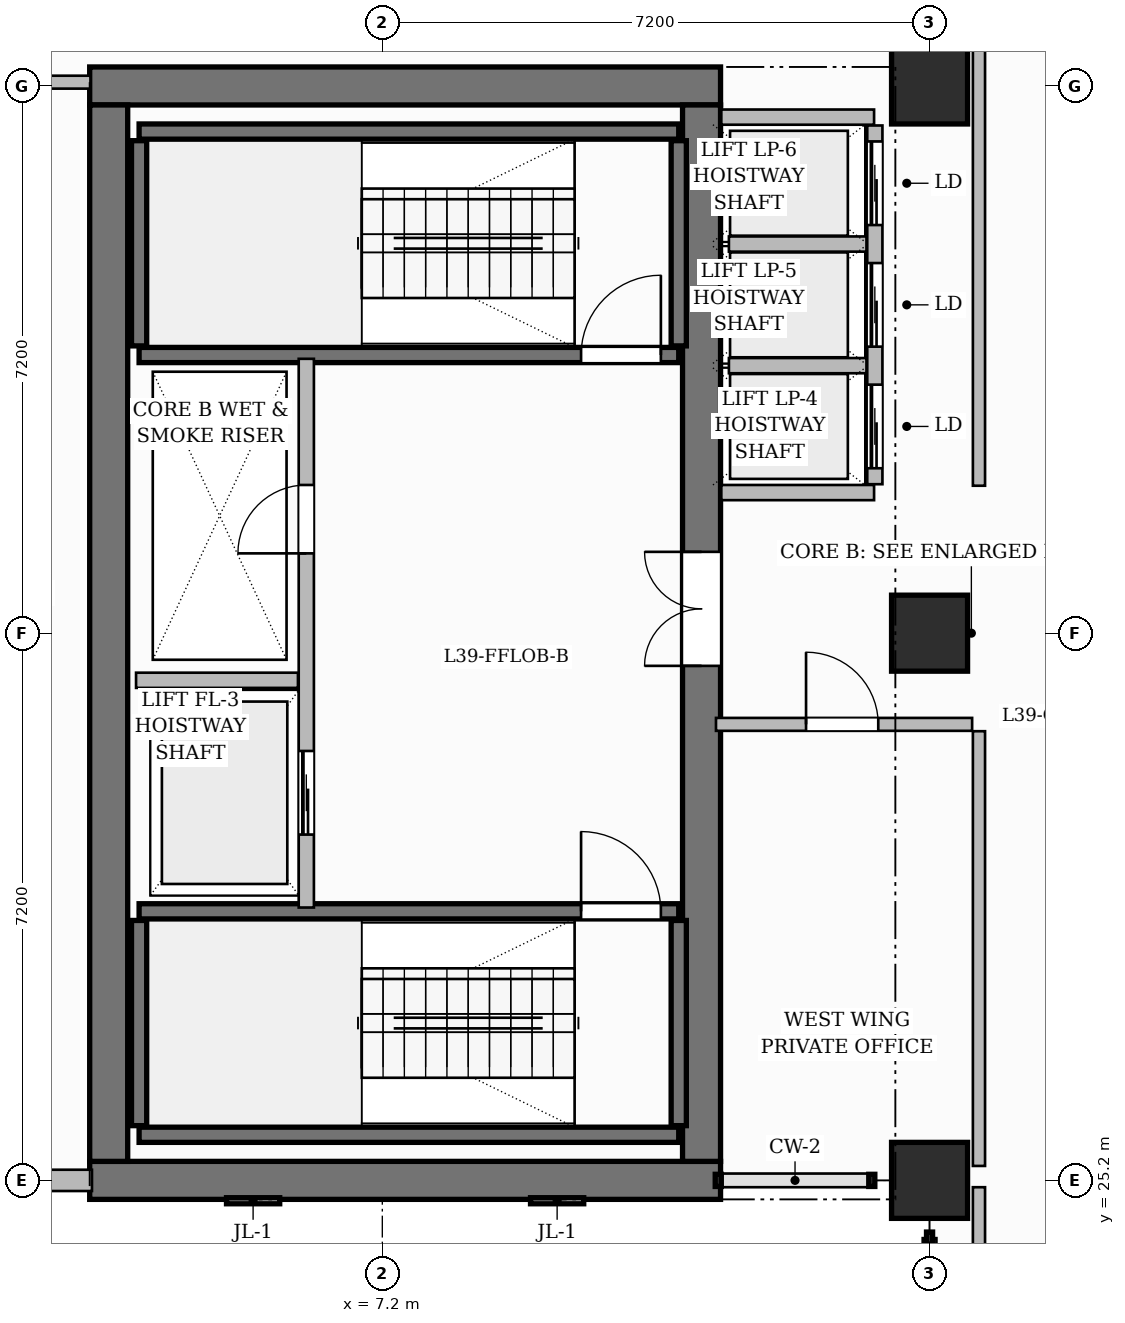
"""IFC4 building model, lengths in metres.
Left out: names, types, materials, properties, quantities, classifications, styles, units other than length and angle.
Written with IfcOpenShell. Run it as: python <this file> out.ifc"""

import sys

from ifc_helpers import new_model, si_unit, direction, frame, frame_2d, origin, origin_2d, place, context, subcontext, project, spatial, rectangle, extrude, source, transform, mapped, element, fill, save


model = new_model("IFC4")
c1 = context("Model", 3, precision=1e-05, world=origin(), true_north=direction((0.0, 1.0)))
c2 = subcontext(c1, "Body", "Model", "MODEL_VIEW")
j1 = project(units=[si_unit("LENGTHUNIT", "METRE"), si_unit("PLANEANGLEUNIT", "RADIAN")], contexts=[c1])
p1 = place(None, origin())
s1 = spatial("IfcSite", under=j1, at=p1, CompositionType="ELEMENT")
p2 = place(p1, origin())
s2 = spatial("IfcBuilding", under=s1, at=p2, CompositionType="ELEMENT")
p3 = place(p2, frame((0.0, 0.0, 158.0)))
s3 = spatial("IfcBuildingStorey", under=s2, at=p3, CompositionType="ELEMENT", Elevation=158.0)
for number, where, z_axis, x_axis in (
    (1, (3.35, 25.2, 0.0), (0.0, 0.0, 1.0), (1.0, 0.0, 0.0)),
    (2, (3.35, 39.6, 0.0), (0.0, 0.0, 1.0), (1.0, 0.0, 0.0)),
):
    element("IfcWall", number, at=place(p3, frame(where, z_axis=z_axis, x_axis=x_axis)), inside=s3, PredefinedType="SHEAR", context=c2, shape_type="SweptSolid", body=[
        extrude(rectangle(XDim=8.3, YDim=0.5, at=frame_2d((4.15, 0.0))), origin(), (0.0, 0.0, 1.0), 3.85),
    ])
p4 = place(p3, frame((3.6, 25.45, 0.0), z_axis=(0.0, 0.0, 1.0), x_axis=(0.0, 1.0, 0.0)))
e3 = element("IfcWall", 3, at=p4, inside=s3, PredefinedType="SHEAR", context=c2, shape_type="SweptSolid", body=[
    extrude(rectangle(XDim=13.9, YDim=0.5, at=frame_2d((6.95, 0.0))), origin(), (0.0, 0.0, 1.0), 3.85),
])
p5 = place(p3, frame((11.4, 25.45, 0.0), z_axis=(0.0, 0.0, 1.0), x_axis=(0.0, 1.0, 0.0)))
e4 = element("IfcWall", 4, at=p5, inside=s3, PredefinedType="SHEAR", context=c2, shape_type="SweptSolid", body=[
    extrude(rectangle(XDim=13.9, YDim=0.5, at=frame_2d((6.95, 0.0))), origin(), (0.0, 0.0, 1.0), 3.85),
])
p6 = place(p5, frame((6.52, 0.0, 0.0)))
e5 = element("IfcOpeningElement", 5, at=p6, cuts=e4, PredefinedType="OPENING", context=c2, shape_type="SweptSolid", body=[
    extrude(rectangle(XDim=1.5, YDim=2.2, at=frame_2d((0.75, 1.1))), frame((0.0, 0.26, 0.0), z_axis=(0.0, -1.0, 0.0), x_axis=(1.0, 0.0, 0.0)), (0.0, 0.0, 1.0), 0.52),
])
m1 = source(origin(), c2, "Body", "SweptSolid", [
    extrude(rectangle(XDim=1.0, YDim=1.0, at=origin_2d()), origin(), (0.0, 0.0, 1.0), 3.85),
])
for number, where, z_axis, x_axis in (
    (6, (14.4, 25.2, 0.0), (0.0, 0.0, 1.0), (1.0, 0.0, 0.0)),
    (7, (14.4, 32.4, 0.0), (0.0, 0.0, 1.0), (1.0, 0.0, 0.0)),
    (8, (14.4, 39.6, 0.0), (0.0, 0.0, 1.0), (1.0, 0.0, 0.0)),
):
    element("IfcColumn", number, at=place(p3, frame(where, z_axis=z_axis, x_axis=x_axis)), inside=s3, PredefinedType="COLUMN", context=c2, shape_type="MappedRepresentation", body=[
        mapped(m1, transform((0.0, 0.0, 0.0), scale=1.0)),
    ])
p7 = place(p3, frame((4.0, 25.8, 0.0), z_axis=(0.0, 0.0, 1.0), x_axis=(1.0, 0.0, 0.0)))
e9 = element("IfcWall", 9, at=p7, inside=s3, PredefinedType="SHEAR", context=c2, shape_type="SweptSolid", body=[
    extrude(rectangle(XDim=7.1, YDim=0.2, at=frame_2d((3.55, 0.0))), origin(), (0.0, 0.0, 1.0), 3.85),
])
for number, where, z_axis, x_axis in (
    (10, (4.0, 25.92, 0.0), (0.0, 0.0, 1.0), (0.0, 1.0, 0.0)),
    (11, (11.1, 25.92, 0.0), (0.0, 0.0, 1.0), (0.0, 1.0, 0.0)),
):
    element("IfcWall", number, at=place(p3, frame(where, z_axis=z_axis, x_axis=x_axis)), inside=s3, PredefinedType="SHEAR", context=c2, shape_type="SweptSolid", body=[
        extrude(rectangle(XDim=2.7, YDim=0.2, at=frame_2d((1.35, 0.0))), origin(), (0.0, 0.0, 1.0), 3.85),
    ])
p8 = place(p3, frame((4.0, 28.74, 0.0), z_axis=(0.0, 0.0, 1.0), x_axis=(1.0, 0.0, 0.0)))
e12 = element("IfcWall", 12, at=p8, inside=s3, PredefinedType="SHEAR", context=c2, shape_type="SweptSolid", body=[
    extrude(rectangle(XDim=7.1, YDim=0.2, at=frame_2d((3.55, 0.0))), origin(), (0.0, 0.0, 1.0), 3.85),
])
p9 = place(p8, frame((5.815, 0.0, 0.0)))
e13 = element("IfcOpeningElement", 13, at=p9, cuts=e12, PredefinedType="OPENING", context=c2, shape_type="SweptSolid", body=[
    extrude(rectangle(XDim=1.05, YDim=2.2, at=frame_2d((0.525, 1.1))), frame((0.0, 0.11, 0.0), z_axis=(0.0, -1.0, 0.0), x_axis=(1.0, 0.0, 0.0)), (0.0, 0.0, 1.0), 0.22),
])
p10 = place(p3, frame((4.0, 39.0, 0.0), z_axis=(0.0, 0.0, 1.0), x_axis=(1.0, 0.0, 0.0)))
e14 = element("IfcWall", 14, at=p10, inside=s3, PredefinedType="SHEAR", context=c2, shape_type="SweptSolid", body=[
    extrude(rectangle(XDim=7.1, YDim=0.2, at=frame_2d((3.55, 0.0))), origin(), (0.0, 0.0, 1.0), 3.85),
])
for number, where, z_axis, x_axis in (
    (15, (4.0, 36.18, 0.0), (0.0, 0.0, 1.0), (0.0, 1.0, 0.0)),
    (16, (11.1, 36.18, 0.0), (0.0, 0.0, 1.0), (0.0, 1.0, 0.0)),
):
    element("IfcWall", number, at=place(p3, frame(where, z_axis=z_axis, x_axis=x_axis)), inside=s3, PredefinedType="SHEAR", context=c2, shape_type="SweptSolid", body=[
        extrude(rectangle(XDim=2.7, YDim=0.2, at=frame_2d((1.35, 0.0))), origin(), (0.0, 0.0, 1.0), 3.85),
    ])
p11 = place(p3, frame((4.0, 36.06, 0.0), z_axis=(0.0, 0.0, 1.0), x_axis=(1.0, 0.0, 0.0)))
e17 = element("IfcWall", 17, at=p11, inside=s3, PredefinedType="SHEAR", context=c2, shape_type="SweptSolid", body=[
    extrude(rectangle(XDim=7.1, YDim=0.2, at=frame_2d((3.55, 0.0))), origin(), (0.0, 0.0, 1.0), 3.85),
])
p12 = place(p11, frame((5.815, 0.0, 0.0)))
e18 = element("IfcOpeningElement", 18, at=p12, cuts=e17, PredefinedType="OPENING", context=c2, shape_type="SweptSolid", body=[
    extrude(rectangle(XDim=1.05, YDim=2.2, at=frame_2d((0.525, 1.1))), frame((0.0, 0.11, 0.0), z_axis=(0.0, -1.0, 0.0), x_axis=(1.0, 0.0, 0.0)), (0.0, 0.0, 1.0), 0.22),
])
p13 = place(p3, frame((6.2, 28.79, 0.0), z_axis=(0.0, 0.0, 1.0), x_axis=(0.0, 1.0, 0.0)))
e19 = element("IfcWall", 19, at=p13, inside=s3, PredefinedType="PARTITIONING", context=c2, shape_type="SweptSolid", body=[
    extrude(rectangle(XDim=7.22, YDim=0.2, at=frame_2d((3.61, 0.0))), origin(), (0.0, 0.0, 1.0), 3.6),
])
p14 = place(p13, frame((4.66, 0.0, 0.0)))
e20 = element("IfcOpeningElement", 20, at=p14, cuts=e19, PredefinedType="OPENING", context=c2, shape_type="SweptSolid", body=[
    extrude(rectangle(XDim=0.9, YDim=2.1, at=frame_2d((0.45, 1.05))), frame((0.0, 0.11, 0.0), z_axis=(0.0, -1.0, 0.0), x_axis=(1.0, 0.0, 0.0)), (0.0, 0.0, 1.0), 0.22),
])
p15 = place(p13, frame((0.96, 0.0, 0.0)))
e21 = element("IfcOpeningElement", 21, at=p15, cuts=e19, PredefinedType="OPENING", context=c2, shape_type="SweptSolid", body=[
    extrude(rectangle(XDim=1.1, YDim=2.2, at=frame_2d((0.55, 1.1))), frame((0.0, 0.11, 0.0), z_axis=(0.0, -1.0, 0.0), x_axis=(1.0, 0.0, 0.0)), (0.0, 0.0, 1.0), 0.22),
])
p16 = place(p3, frame((3.96, 31.78, 0.0), z_axis=(0.0, 0.0, 1.0), x_axis=(1.0, 0.0, 0.0)))
e22 = element("IfcWall", 22, at=p16, inside=s3, PredefinedType="PARTITIONING", context=c2, shape_type="SweptSolid", body=[
    extrude(rectangle(XDim=2.13, YDim=0.2, at=frame_2d((1.065, 0.0))), origin(), (0.0, 0.0, 1.0), 3.6),
])
for number, where, z_axis, x_axis in (
    (23, (11.66, 34.25, 0.0), (0.0, 0.0, 1.0), (1.0, 0.0, 0.0)),
    (24, (11.66, 39.19, 0.0), (0.0, 0.0, 1.0), (1.0, 0.0, 0.0)),
):
    element("IfcWall", number, at=place(p3, frame(where, z_axis=z_axis, x_axis=x_axis)), inside=s3, PredefinedType="PARTITIONING", context=c2, shape_type="SweptSolid", body=[
        extrude(rectangle(XDim=2.01, YDim=0.2, at=frame_2d((1.005, 0.0))), origin(), (0.0, 0.0, 1.0), 3.6),
    ])
p17 = place(p3, frame((13.68, 34.36, 0.0), z_axis=(0.0, 0.0, 1.0), x_axis=(0.0, 1.0, 0.0)))
e25 = element("IfcWall", 25, at=p17, inside=s3, PredefinedType="PARTITIONING", context=c2, shape_type="SweptSolid", body=[
    extrude(rectangle(XDim=4.72, YDim=0.2, at=frame_2d((2.36, 0.0))), origin(), (0.0, 0.0, 1.0), 3.6),
])
p18 = place(p17, frame((0.21, 0.0, 0.0)))
e26 = element("IfcOpeningElement", 26, at=p18, cuts=e25, PredefinedType="OPENING", context=c2, shape_type="SweptSolid", body=[
    extrude(rectangle(XDim=1.1, YDim=2.2, at=frame_2d((0.55, 1.1))), frame((0.0, 0.11, 0.0), z_axis=(0.0, -1.0, 0.0), x_axis=(1.0, 0.0, 0.0)), (0.0, 0.0, 1.0), 0.22),
])
p19 = place(p17, frame((1.81, 0.0, 0.0)))
e27 = element("IfcOpeningElement", 27, at=p19, cuts=e25, PredefinedType="OPENING", context=c2, shape_type="SweptSolid", body=[
    extrude(rectangle(XDim=1.1, YDim=2.2, at=frame_2d((0.55, 1.1))), frame((0.0, 0.11, 0.0), z_axis=(0.0, -1.0, 0.0), x_axis=(1.0, 0.0, 0.0)), (0.0, 0.0, 1.0), 0.22),
])
p20 = place(p17, frame((3.41, 0.0, 0.0)))
e28 = element("IfcOpeningElement", 28, at=p20, cuts=e25, PredefinedType="OPENING", context=c2, shape_type="SweptSolid", body=[
    extrude(rectangle(XDim=1.1, YDim=2.2, at=frame_2d((0.55, 1.1))), frame((0.0, 0.11, 0.0), z_axis=(0.0, -1.0, 0.0), x_axis=(1.0, 0.0, 0.0)), (0.0, 0.0, 1.0), 0.22),
])
for number, where, z_axis, x_axis in (
    (29, (11.76, 35.92, 0.0), (0.0, 0.0, 1.0), (1.0, 0.0, 0.0)),
    (30, (11.76, 37.52, 0.0), (0.0, 0.0, 1.0), (1.0, 0.0, 0.0)),
):
    element("IfcWall", number, at=place(p3, frame(where, z_axis=z_axis, x_axis=x_axis)), inside=s3, PredefinedType="PARTITIONING", context=c2, shape_type="SweptSolid", body=[
        extrude(rectangle(XDim=1.81, YDim=0.2, at=frame_2d((0.905, 0.0))), origin(), (0.0, 0.0, 1.0), 3.6),
    ])
p21 = place(p3, frame((15.05, 11.96, 0.0), z_axis=(0.0, 0.0, 1.0), x_axis=(0.0, 1.0, 0.0)))
e31 = element("IfcWall", 31, at=p21, inside=s3, PredefinedType="PARTITIONING", context=c2, shape_type="SweptSolid", body=[
    extrude(rectangle(XDim=13.15, YDim=0.16, at=frame_2d((6.575, 0.0))), origin(), (0.0, 0.0, 1.0), 3.6),
])
p22 = place(p3, frame((0.24, 39.65, 0.0), z_axis=(0.0, 0.0, 1.0), x_axis=(1.0, 0.0, 0.0)))
e32 = element("IfcWall", 32, at=p22, inside=s3, PredefinedType="PARTITIONING", context=c2, shape_type="SweptSolid", body=[
    extrude(rectangle(XDim=3.12, YDim=0.17, at=frame_2d((1.56, 0.0))), origin(), (0.0, 0.0, 1.0), 3.6),
])
p23 = place(p22, frame((1.11, 0.0, 0.0)))
e33 = element("IfcOpeningElement", 33, at=p23, cuts=e32, PredefinedType="OPENING", context=c2, shape_type="SweptSolid", body=[
    extrude(rectangle(XDim=0.9, YDim=2.15, at=frame_2d((0.45, 1.075))), frame((0.0, 0.095, 0.0), z_axis=(0.0, -1.0, 0.0), x_axis=(1.0, 0.0, 0.0)), (0.0, 0.0, 1.0), 0.19),
])
p24 = place(p3, frame((15.05, 34.34, 0.0), z_axis=(0.0, 0.0, 1.0), x_axis=(0.0, 1.0, 0.0)))
e34 = element("IfcWall", 34, at=p24, inside=s3, PredefinedType="PARTITIONING", context=c2, shape_type="SweptSolid", body=[
    extrude(rectangle(XDim=12.312, YDim=0.16, at=frame_2d((6.156, 0.0))), origin(), (0.0, 0.0, 1.0), 3.6),
])
p25 = place(p24, frame((8.01, 0.0, 0.0)))
e35 = element("IfcOpeningElement", 35, at=p25, cuts=e34, PredefinedType="OPENING", context=c2, shape_type="SweptSolid", body=[
    extrude(rectangle(XDim=1.6, YDim=2.4, at=frame_2d((0.8, 1.2))), frame((0.0, 0.09, 0.0), z_axis=(0.0, -1.0, 0.0), x_axis=(1.0, 0.0, 0.0)), (0.0, 0.0, 1.0), 0.18),
])
p26 = place(p3, frame((15.05, 25.39, 0.0), z_axis=(0.0, 0.0, 1.0), x_axis=(0.0, 1.0, 0.0)))
e36 = element("IfcWall", 36, at=p26, inside=s3, PredefinedType="PARTITIONING", context=c2, shape_type="SweptSolid", body=[
    extrude(rectangle(XDim=5.72, YDim=0.16, at=frame_2d((2.86, 0.0))), origin(), (0.0, 0.0, 1.0), 3.6),
])
p27 = place(p3, frame((11.59, 31.2, 0.0), z_axis=(0.0, 0.0, 1.0), x_axis=(1.0, 0.0, 0.0)))
e37 = element("IfcWall", 37, at=p27, inside=s3, PredefinedType="PARTITIONING", context=c2, shape_type="SweptSolid", body=[
    extrude(rectangle(XDim=3.37, YDim=0.17, at=frame_2d((1.685, 0.0))), origin(), (0.0, 0.0, 1.0), 3.6),
])
p28 = place(p27, frame((1.185, 0.0, 0.0)))
e38 = element("IfcOpeningElement", 38, at=p28, cuts=e37, PredefinedType="OPENING", context=c2, shape_type="SweptSolid", body=[
    extrude(rectangle(XDim=0.95, YDim=2.15, at=frame_2d((0.475, 1.075))), frame((0.0, 0.095, 0.0), z_axis=(0.0, -1.0, 0.0), x_axis=(1.0, 0.0, 0.0)), (0.0, 0.0, 1.0), 0.19),
])
p29 = place(p3, frame((0.0, 25.2, 0.0), z_axis=(0.0, 0.0, 1.0), x_axis=(1.0, 0.0, 0.0)))
e39 = element("IfcWall", 39, at=p29, inside=s3, PredefinedType="SOLIDWALL", context=c2, shape_type="SweptSolid", body=[
    extrude(rectangle(XDim=3.38, YDim=0.28, at=frame_2d((1.69, 0.0))), origin(), (0.0, 0.0, 1.0), 3.6),
])
p30 = place(p29, frame((1.205, 0.0, 0.8)))
e40 = element("IfcOpeningElement", 40, at=p30, cuts=e39, PredefinedType="OPENING", context=c2, shape_type="SweptSolid", body=[
    extrude(rectangle(XDim=1.4, YDim=1.85, at=frame_2d((0.7, 0.925))), frame((0.0, 0.15, 0.0), z_axis=(0.0, -1.0, 0.0), x_axis=(1.0, 0.0, 0.0)), (0.0, 0.0, 1.0), 0.3),
])
m2 = source(origin(), c2, "Body", "SweptSolid", [
    extrude(rectangle(XDim=1.05, YDim=2.2, at=frame_2d((0.525, 1.1))), frame((0.0, 0.025, 0.0), z_axis=(0.0, -1.0, 0.0), x_axis=(1.0, 0.0, 0.0)), (0.0, 0.0, 1.0), 0.05),
])
p31 = place(p9, origin())
e41 = element("IfcDoor", 41, at=p31, inside=s3, OperationType="SINGLE_SWING_LEFT", PredefinedType="DOOR", context=c2, shape_type="MappedRepresentation", body=[
    mapped(m2, transform((0.0, 0.0, 0.0), scale=1.0)),
])
fill(e13, e41)
p32 = place(p12, origin())
e42 = element("IfcDoor", 42, at=p32, inside=s3, OperationType="SINGLE_SWING_RIGHT", PredefinedType="DOOR", context=c2, shape_type="MappedRepresentation", body=[
    mapped(m2, transform((0.0, 0.0, 0.0), scale=1.0)),
])
fill(e18, e42)
m3 = source(origin(), c2, "Body", "SweptSolid", [
    extrude(rectangle(XDim=0.9, YDim=2.1, at=frame_2d((0.45, 1.05))), frame((0.0, 0.025, 0.0), z_axis=(0.0, -1.0, 0.0), x_axis=(1.0, 0.0, 0.0)), (0.0, 0.0, 1.0), 0.05),
])
p33 = place(p14, origin())
e43 = element("IfcDoor", 43, at=p33, inside=s3, OperationType="SINGLE_SWING_LEFT", PredefinedType="DOOR", context=c2, shape_type="MappedRepresentation", body=[
    mapped(m3, transform((0.0, 0.0, 0.0), scale=1.0)),
])
fill(e20, e43)
m4 = source(origin(), c2, "Body", "SweptSolid", [
    extrude(rectangle(XDim=1.5, YDim=2.2, at=frame_2d((0.75, 1.1))), frame((0.0, 0.025, 0.0), z_axis=(0.0, -1.0, 0.0), x_axis=(1.0, 0.0, 0.0)), (0.0, 0.0, 1.0), 0.05),
])
p34 = place(p6, origin())
e44 = element("IfcDoor", 44, at=p34, inside=s3, OperationType="DOUBLE_DOOR_SINGLE_SWING", PredefinedType="DOOR", context=c2, shape_type="MappedRepresentation", body=[
    mapped(m4, transform((0.0, 0.0, 0.0), scale=1.0)),
])
fill(e5, e44)
m5 = source(origin(), c2, "Body", "SweptSolid", [
    extrude(rectangle(XDim=0.95, YDim=2.15, at=frame_2d((0.475, 1.075))), frame((0.0, 0.025, 0.0), z_axis=(0.0, -1.0, 0.0), x_axis=(1.0, 0.0, 0.0)), (0.0, 0.0, 1.0), 0.05),
])
p35 = place(p28, origin())
e45 = element("IfcDoor", 45, at=p35, inside=s3, OperationType="SINGLE_SWING_LEFT", PredefinedType="DOOR", context=c2, shape_type="MappedRepresentation", body=[
    mapped(m5, transform((0.0, 0.0, 0.0), scale=1.0)),
])
fill(e38, e45)
m6 = source(origin(), c2, "Body", "SweptSolid", [
    extrude(rectangle(XDim=1.1, YDim=2.2, at=frame_2d((0.55, 1.1))), frame((0.0, 0.025, 0.0), z_axis=(0.0, -1.0, 0.0), x_axis=(1.0, 0.0, 0.0)), (0.0, 0.0, 1.0), 0.05),
])
p36 = place(p15, origin())
e46 = element("IfcDoor", 46, at=p36, inside=s3, OperationType="SLIDING_TO_LEFT", PredefinedType="DOOR", context=c2, shape_type="MappedRepresentation", body=[
    mapped(m6, transform((0.0, 0.0, 0.0), scale=1.0)),
])
fill(e21, e46)
p37 = place(p18, origin())
e47 = element("IfcDoor", 47, at=p37, inside=s3, OperationType="SLIDING_TO_LEFT", PredefinedType="DOOR", context=c2, shape_type="MappedRepresentation", body=[
    mapped(m6, transform((0.0, 0.0, 0.0), scale=1.0)),
])
fill(e26, e47)
p38 = place(p19, origin())
e48 = element("IfcDoor", 48, at=p38, inside=s3, OperationType="SLIDING_TO_LEFT", PredefinedType="DOOR", context=c2, shape_type="MappedRepresentation", body=[
    mapped(m6, transform((0.0, 0.0, 0.0), scale=1.0)),
])
fill(e27, e48)
p39 = place(p20, origin())
e49 = element("IfcDoor", 49, at=p39, inside=s3, OperationType="SLIDING_TO_LEFT", PredefinedType="DOOR", context=c2, shape_type="MappedRepresentation", body=[
    mapped(m6, transform((0.0, 0.0, 0.0), scale=1.0)),
])
fill(e28, e49)
save(model, sys.argv[1])
